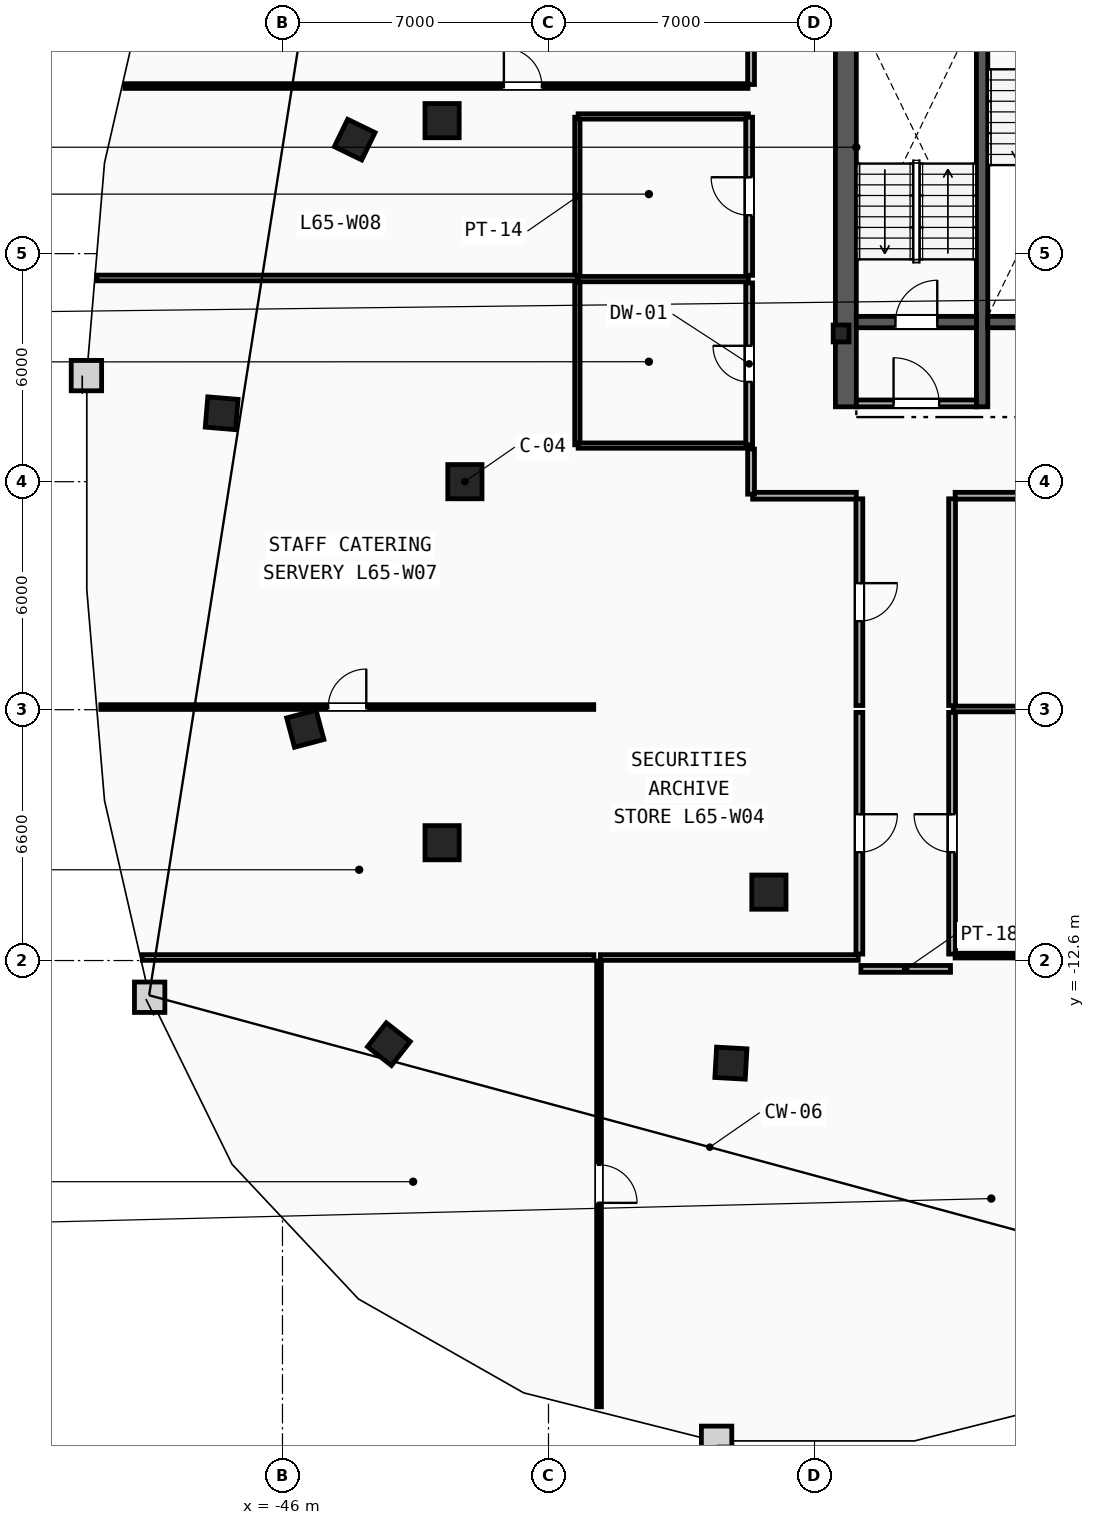
"""IFC4 building model, lengths in metres.
Left out: names, types, materials, properties, quantities, classifications, styles, units other than length and angle.
Written with IfcOpenShell. Run it as: python <this file> out.ifc"""

import sys

from ifc_helpers import new_model, si_unit, direction, frame, frame_2d, origin, origin_2d, place, context, subcontext, project, spatial, rectangle, i_section, extrude, element, fill, save


model = new_model("IFC4")
c1 = context("Model", 3, precision=1e-05, world=origin(), true_north=direction((0.0, 1.0)))
c2 = subcontext(c1, "Body", "Model", "MODEL_VIEW")
j1 = project(units=[si_unit("LENGTHUNIT", "METRE"), si_unit("PLANEANGLEUNIT", "RADIAN")], contexts=[c1])
p1 = place(None, origin())
s1 = spatial("IfcSite", under=j1, at=p1, CompositionType="ELEMENT")
p2 = place(p1, origin())
s2 = spatial("IfcBuilding", under=s1, at=p2, CompositionType="ELEMENT")
p3 = place(p2, frame((0.0, 0.0, 246.8)))
s3 = spatial("IfcBuildingStorey", under=s2, at=p3, CompositionType="ELEMENT", Elevation=246.8)
p4 = place(p3, frame((-31.3, 3.9, 0.0), z_axis=(0.0, 0.0, 1.0), x_axis=(1.0, 0.0, 0.0)))
e1 = element("IfcColumn", 1, at=p4, inside=s3, PredefinedType="COLUMN", context=c2, shape_type="SweptSolid", body=[
    extrude(i_section(OverallWidth=0.416, OverallDepth=0.446, WebThickness=0.039, FlangeThickness=0.063, FilletRadius=0.018, at=origin_2d()), origin(), (0.0, 0.0, 1.0), 3.6),
])
for number, where, z_axis, x_axis in (
    (2, (-41.2, 0.0, 0.0), (0.0, 0.0, 1.0), (1.0, 0.0, 0.0)),
    (3, (-41.8, 9.5, 0.0), (0.0, 0.0, 1.0), (1.0, 0.0, 0.0)),
    (4, (-41.8, -9.5, 0.0), (0.0, 0.0, 1.0), (1.0, 0.0, 0.0)),
    (5, (-33.2, -10.8, 0.0), (0.0, 0.0, 1.0), (1.0, 0.0, 0.0)),
):
    element("IfcColumn", number, at=place(p3, frame(where, z_axis=z_axis, x_axis=x_axis)), inside=s3, PredefinedType="COLUMN", context=c2, shape_type="SweptSolid", body=[
        extrude(rectangle(XDim=0.9, YDim=0.9, at=origin_2d()), origin(), (0.0, 0.0, 1.0), 3.6),
    ])
for number, where, z_axis, x_axis in (
    (6, (-44.1, 9.0, 0.0), (0.0, 0.0, 1.0), (-0.437, -0.899, 0.0)),
    (7, (-47.6, 1.8, 0.0), (0.0, 0.0, 1.0), (-0.084, -0.997, 0.0)),
    (8, (-45.4, -6.5, 0.0), (0.0, 0.0, 1.0), (0.256, -0.967, 0.0)),
    (9, (-43.2, -14.8, 0.0), (0.0, 0.0, 1.0), (0.786, -0.618, 0.0)),
    (10, (-34.2, -15.3, 0.0), (0.0, 0.0, 1.0), (0.998, -0.055, 0.0)),
):
    element("IfcColumn", number, at=place(p3, frame(where, z_axis=z_axis, x_axis=x_axis)), inside=s3, PredefinedType="COLUMN", context=c2, shape_type="SweptSolid", body=[
        extrude(rectangle(XDim=0.8, YDim=0.8, at=origin_2d()), origin(), (0.0, 0.0, 1.0), 3.6),
    ])
p5 = place(p3, frame((-31.175, 1.97, 0.0), z_axis=(0.0, 0.0, 1.0), x_axis=(0.0, 1.0, 0.0)))
e11 = element("IfcWall", 11, at=p5, inside=s3, PredefinedType="SHEAR", context=c2, shape_type="SweptSolid", body=[
    extrude(rectangle(XDim=13.33, YDim=0.55, at=frame_2d((6.665, 0.0))), origin(), (0.0, 0.0, 1.0), 3.34),
])
p6 = place(p3, frame((-27.59, 1.97, 0.0), z_axis=(0.0, 0.0, 1.0), x_axis=(0.0, 1.0, 0.0)))
e12 = element("IfcWall", 12, at=p6, inside=s3, PredefinedType="SHEAR", context=c2, shape_type="SweptSolid", body=[
    extrude(rectangle(XDim=10.68, YDim=0.3, at=frame_2d((5.34, 0.0))), origin(), (0.0, 0.0, 1.0), 3.34),
])
p7 = place(p3, frame((-30.9, 4.2, 0.0), z_axis=(0.0, 0.0, 1.0), x_axis=(1.0, 0.0, 0.0)))
e13 = element("IfcWall", 13, at=p7, inside=s3, PredefinedType="SHEAR", context=c2, shape_type="SweptSolid", body=[
    extrude(rectangle(XDim=3.16, YDim=0.3, at=frame_2d((1.58, 0.0))), origin(), (0.0, 0.0, 1.0), 3.34),
])
p8 = place(p7, frame((1.03, 0.0, 0.0)))
e14 = element("IfcOpeningElement", 14, at=p8, cuts=e13, PredefinedType="OPENING", context=c2, shape_type="SweptSolid", body=[
    extrude(rectangle(XDim=1.1, YDim=2.15, at=frame_2d((0.55, 1.075))), frame((0.0, 0.16, 0.0), z_axis=(0.0, -1.0, 0.0), x_axis=(1.0, 0.0, 0.0)), (0.0, 0.0, 1.0), 0.32),
])
p9 = place(p3, frame((-27.44, 4.2, 0.0), z_axis=(0.0, 0.0, 1.0), x_axis=(1.0, 0.0, 0.0)))
e15 = element("IfcWall", 15, at=p9, inside=s3, PredefinedType="SHEAR", context=c2, shape_type="SweptSolid", body=[
    extrude(rectangle(XDim=3.16, YDim=0.3, at=frame_2d((1.58, 0.0))), origin(), (0.0, 0.0, 1.0), 3.34),
])
p10 = place(p3, frame((-30.9, 2.06, 0.0), z_axis=(0.0, 0.0, 1.0), x_axis=(1.0, 0.0, 0.0)))
e16 = element("IfcWall", 16, at=p10, inside=s3, PredefinedType="PARTITIONING", context=c2, shape_type="SweptSolid", body=[
    extrude(rectangle(XDim=3.16, YDim=0.18, at=frame_2d((1.58, 0.0))), origin(), (0.0, 0.0, 1.0), 3.34),
])
p11 = place(p10, frame((0.98, 0.0, 0.0)))
e17 = element("IfcOpeningElement", 17, at=p11, cuts=e16, PredefinedType="OPENING", context=c2, shape_type="SweptSolid", body=[
    extrude(rectangle(XDim=1.2, YDim=2.15, at=frame_2d((0.6, 1.075))), frame((0.0, 0.1, 0.0), z_axis=(0.0, -1.0, 0.0), x_axis=(1.0, 0.0, 0.0)), (0.0, 0.0, 1.0), 0.2),
])
p12 = place(p3, frame((-38.24, 0.97, 0.0), z_axis=(0.0, 0.0, 1.0), x_axis=(0.0, 1.0, 0.0)))
e18 = element("IfcWall", 18, at=p12, inside=s3, PredefinedType="PARTITIONING", context=c2, shape_type="SweptSolid", body=[
    extrude(rectangle(XDim=4.275, YDim=0.14, at=frame_2d((2.138, 0.0))), origin(), (0.0, 0.0, 1.0), 3.34),
])
p13 = place(p3, frame((-38.24, 5.415, 0.0), z_axis=(0.0, 0.0, 1.0), x_axis=(0.0, 1.0, 0.0)))
e19 = element("IfcWall", 19, at=p13, inside=s3, PredefinedType="PARTITIONING", context=c2, shape_type="SweptSolid", body=[
    extrude(rectangle(XDim=4.175, YDim=0.14, at=frame_2d((2.087, 0.0))), origin(), (0.0, 0.0, 1.0), 3.34),
])
for number, where, z_axis, x_axis in (
    (20, (-38.22, 0.95, 0.0), (0.0, 0.0, 1.0), (1.0, 0.0, 0.0)),
    (21, (-38.22, 5.33, 0.0), (0.0, 0.0, 1.0), (1.0, 0.0, 0.0)),
    (22, (-38.22, 9.61, 0.0), (0.0, 0.0, 1.0), (1.0, 0.0, 0.0)),
):
    element("IfcWall", number, at=place(p3, frame(where, z_axis=z_axis, x_axis=x_axis)), inside=s3, PredefinedType="PARTITIONING", context=c2, shape_type="SweptSolid", body=[
        extrude(rectangle(XDim=4.48, YDim=0.14, at=frame_2d((2.24, 0.0))), origin(), (0.0, 0.0, 1.0), 3.34),
    ])
p14 = place(p3, frame((-33.72, 0.97, 0.0), z_axis=(0.0, 0.0, 1.0), x_axis=(0.0, 1.0, 0.0)))
e23 = element("IfcWall", 23, at=p14, inside=s3, PredefinedType="PARTITIONING", context=c2, shape_type="SweptSolid", body=[
    extrude(rectangle(XDim=4.26, YDim=0.18, at=frame_2d((2.13, 0.0))), origin(), (0.0, 0.0, 1.0), 3.34),
])
p15 = place(p14, frame((1.655, 0.0, 0.0)))
e24 = element("IfcOpeningElement", 24, at=p15, cuts=e23, PredefinedType="OPENING", context=c2, shape_type="SweptSolid", body=[
    extrude(rectangle(XDim=0.95, YDim=2.1, at=frame_2d((0.475, 1.05))), frame((0.0, 0.1, 0.0), z_axis=(0.0, -1.0, 0.0), x_axis=(1.0, 0.0, 0.0)), (0.0, 0.0, 1.0), 0.2),
])
p16 = place(p3, frame((-33.72, 5.43, 0.0), z_axis=(0.0, 0.0, 1.0), x_axis=(0.0, 1.0, 0.0)))
e25 = element("IfcWall", 25, at=p16, inside=s3, PredefinedType="PARTITIONING", context=c2, shape_type="SweptSolid", body=[
    extrude(rectangle(XDim=4.16, YDim=0.18, at=frame_2d((2.08, 0.0))), origin(), (0.0, 0.0, 1.0), 3.34),
])
p17 = place(p16, frame((1.58, 0.0, 0.0)))
e26 = element("IfcOpeningElement", 26, at=p17, cuts=e25, PredefinedType="OPENING", context=c2, shape_type="SweptSolid", body=[
    extrude(rectangle(XDim=1.0, YDim=2.15, at=frame_2d((0.5, 1.075))), frame((0.0, 0.1, 0.0), z_axis=(0.0, -1.0, 0.0), x_axis=(1.0, 0.0, 0.0)), (0.0, 0.0, 1.0), 0.2),
])
p18 = place(p3, frame((-28.35, -5.98, 0.0), z_axis=(0.0, 0.0, 1.0), x_axis=(1.0, 0.0, 0.0)))
e27 = element("IfcWall", 27, at=p18, inside=s3, PredefinedType="PARTITIONING", context=c2, shape_type="SweptSolid", body=[
    extrude(rectangle(XDim=15.185, YDim=0.15, at=frame_2d((7.593, 0.0))), origin(), (0.0, 0.0, 1.0), 3.34),
])
p19 = place(p3, frame((-49.686, -12.52, 0.0), z_axis=(0.0, 0.0, 1.0), x_axis=(1.0, 0.0, 0.0)))
e28 = element("IfcWall", 28, at=p19, inside=s3, PredefinedType="PARTITIONING", context=c2, shape_type="SweptSolid", body=[
    extrude(rectangle(XDim=11.881, YDim=0.15, at=frame_2d((5.94, 0.0))), origin(), (0.0, 0.0, 1.0), 3.34),
])
p20 = place(p3, frame((-37.635, -12.52, 0.0), z_axis=(0.0, 0.0, 1.0), x_axis=(1.0, 0.0, 0.0)))
e29 = element("IfcWall", 29, at=p20, inside=s3, PredefinedType="PARTITIONING", context=c2, shape_type="SweptSolid", body=[
    extrude(rectangle(XDim=6.785, YDim=0.15, at=frame_2d((3.393, 0.0))), origin(), (0.0, 0.0, 1.0), 3.34),
])
p21 = place(p3, frame((-50.887, 5.36, 0.0), z_axis=(0.0, 0.0, 1.0), x_axis=(1.0, 0.0, 0.0)))
e30 = element("IfcWall", 30, at=p21, inside=s3, PredefinedType="PARTITIONING", context=c2, shape_type="SweptSolid", body=[
    extrude(rectangle(XDim=12.648, YDim=0.15, at=frame_2d((6.324, 0.0))), origin(), (0.0, 0.0, 1.0), 3.34),
])
p22 = place(p3, frame((-30.779, -12.82, 0.0), z_axis=(0.0, 0.0, 1.0), x_axis=(1.0, 0.0, 0.0)))
e31 = element("IfcWall", 31, at=p22, inside=s3, PredefinedType="PARTITIONING", context=c2, shape_type="SweptSolid", body=[
    extrude(rectangle(XDim=2.357, YDim=0.18, at=frame_2d((1.179, 0.0))), origin(), (0.0, 0.0, 1.0), 3.34),
])
p23 = place(p3, frame((-30.82, -6.07, 0.0), z_axis=(0.0, 0.0, 1.0), x_axis=(0.0, -1.0, 0.0)))
e32 = element("IfcWall", 32, at=p23, inside=s3, PredefinedType="PARTITIONING", context=c2, shape_type="SweptSolid", body=[
    extrude(rectangle(XDim=6.36, YDim=0.18, at=frame_2d((3.18, 0.0))), origin(), (0.0, 0.0, 1.0), 3.34),
])
p24 = place(p23, frame((2.68, 0.0, 0.0)))
e33 = element("IfcOpeningElement", 33, at=p24, cuts=e32, PredefinedType="OPENING", context=c2, shape_type="SweptSolid", body=[
    extrude(rectangle(XDim=1.0, YDim=2.15, at=frame_2d((0.5, 1.075))), frame((0.0, 0.1, 0.0), z_axis=(0.0, -1.0, 0.0), x_axis=(1.0, 0.0, 0.0)), (0.0, 0.0, 1.0), 0.2),
])
p25 = place(p3, frame((-28.38, -12.43, 0.0), z_axis=(0.0, 0.0, 1.0), x_axis=(0.0, 1.0, 0.0)))
e34 = element("IfcWall", 34, at=p25, inside=s3, PredefinedType="PARTITIONING", context=c2, shape_type="SweptSolid", body=[
    extrude(rectangle(XDim=6.36, YDim=0.18, at=frame_2d((3.18, 0.0))), origin(), (0.0, 0.0, 1.0), 3.34),
])
p26 = place(p25, frame((2.68, 0.0, 0.0)))
e35 = element("IfcOpeningElement", 35, at=p26, cuts=e34, PredefinedType="OPENING", context=c2, shape_type="SweptSolid", body=[
    extrude(rectangle(XDim=1.0, YDim=2.15, at=frame_2d((0.5, 1.075))), frame((0.0, 0.1, 0.0), z_axis=(0.0, -1.0, 0.0), x_axis=(1.0, 0.0, 0.0)), (0.0, 0.0, 1.0), 0.2),
])
p27 = place(p3, frame((-28.3, -0.37, 0.0), z_axis=(0.0, 0.0, 1.0), x_axis=(1.0, 0.0, 0.0)))
e36 = element("IfcWall", 36, at=p27, inside=s3, PredefinedType="PARTITIONING", context=c2, shape_type="SweptSolid", body=[
    extrude(rectangle(XDim=15.349, YDim=0.18, at=frame_2d((7.675, 0.0))), origin(), (0.0, 0.0, 1.0), 3.34),
])
p28 = place(p27, frame((7.175, 0.0, 0.0)))
e37 = element("IfcOpeningElement", 37, at=p28, cuts=e36, PredefinedType="OPENING", context=c2, shape_type="SweptSolid", body=[
    extrude(rectangle(XDim=1.0, YDim=2.15, at=frame_2d((0.5, 1.075))), frame((0.0, 0.1, 0.0), z_axis=(0.0, -1.0, 0.0), x_axis=(1.0, 0.0, 0.0)), (0.0, 0.0, 1.0), 0.2),
])
p29 = place(p3, frame((-28.38, -5.89, 0.0), z_axis=(0.0, 0.0, 1.0), x_axis=(0.0, 1.0, 0.0)))
e38 = element("IfcWall", 38, at=p29, inside=s3, PredefinedType="PARTITIONING", context=c2, shape_type="SweptSolid", body=[
    extrude(rectangle(XDim=5.44, YDim=0.18, at=frame_2d((2.72, 0.0))), origin(), (0.0, 0.0, 1.0), 3.34),
])
p30 = place(p3, frame((-30.82, -0.45, 0.0), z_axis=(0.0, 0.0, 1.0), x_axis=(0.0, -1.0, 0.0)))
e39 = element("IfcWall", 39, at=p30, inside=s3, PredefinedType="PARTITIONING", context=c2, shape_type="SweptSolid", body=[
    extrude(rectangle(XDim=5.44, YDim=0.18, at=frame_2d((2.72, 0.0))), origin(), (0.0, 0.0, 1.0), 3.34),
])
p31 = place(p30, frame((2.22, 0.0, 0.0)))
e40 = element("IfcOpeningElement", 40, at=p31, cuts=e39, PredefinedType="OPENING", context=c2, shape_type="SweptSolid", body=[
    extrude(rectangle(XDim=1.0, YDim=2.15, at=frame_2d((0.5, 1.075))), frame((0.0, 0.1, 0.0), z_axis=(0.0, -1.0, 0.0), x_axis=(1.0, 0.0, 0.0)), (0.0, 0.0, 1.0), 0.2),
])
p32 = place(p3, frame((-33.628, -0.37, 0.0), z_axis=(0.0, 0.0, 1.0), x_axis=(1.0, 0.0, 0.0)))
e41 = element("IfcWall", 41, at=p32, inside=s3, PredefinedType="PARTITIONING", context=c2, shape_type="SweptSolid", body=[
    extrude(rectangle(XDim=2.729, YDim=0.18, at=frame_2d((1.364, 0.0))), origin(), (0.0, 0.0, 1.0), 3.34),
])
p33 = place(p3, frame((-33.67, 0.859, 0.0), z_axis=(0.0, 0.0, 1.0), x_axis=(0.0, -1.0, 0.0)))
e42 = element("IfcWall", 42, at=p33, inside=s3, PredefinedType="PARTITIONING", context=c2, shape_type="SweptSolid", body=[
    extrude(rectangle(XDim=1.187, YDim=0.18, at=frame_2d((0.594, 0.0))), origin(), (0.0, 0.0, 1.0), 3.34),
])
p34 = place(p3, frame((-33.67, 17.428, 0.0), z_axis=(0.0, 0.0, 1.0), x_axis=(0.0, -1.0, 0.0)))
e43 = element("IfcWall", 43, at=p34, inside=s3, PredefinedType="PARTITIONING", context=c2, shape_type="SweptSolid", body=[
    extrude(rectangle(XDim=6.979, YDim=0.18, at=frame_2d((3.489, 0.0))), origin(), (0.0, 0.0, 1.0), 3.34),
])
p35 = place(p3, frame((-28.3, -12.47, 0.0), z_axis=(0.0, 0.0, 1.0), x_axis=(1.0, 0.0, 0.0)))
e44 = element("IfcWall", 44, at=p35, inside=s3, PredefinedType="PARTITIONING", context=c2, shape_type="SweptSolid", body=[
    extrude(rectangle(XDim=13.919, YDim=0.125, at=frame_2d((6.959, 0.0))), origin(), (0.0, 0.0, 1.0), 3.34),
])
p36 = place(p35, frame((6.459, 0.0, 0.0)))
e45 = element("IfcOpeningElement", 45, at=p36, cuts=e44, PredefinedType="OPENING", context=c2, shape_type="SweptSolid", body=[
    extrude(rectangle(XDim=1.0, YDim=2.15, at=frame_2d((0.5, 1.075))), frame((0.0, 0.073, 0.0), z_axis=(0.0, -1.0, 0.0), x_axis=(1.0, 0.0, 0.0)), (0.0, 0.0, 1.0), 0.145),
])
p37 = place(p3, frame((-37.67, -12.61, 0.0), z_axis=(0.0, 0.0, 1.0), x_axis=(0.0, -1.0, 0.0)))
e46 = element("IfcWall", 46, at=p37, inside=s3, PredefinedType="PARTITIONING", context=c2, shape_type="SweptSolid", body=[
    extrude(rectangle(XDim=11.731, YDim=0.125, at=frame_2d((5.866, 0.0))), origin(), (0.0, 0.0, 1.0), 3.34),
])
p38 = place(p37, frame((5.366, 0.0, 0.0)))
e47 = element("IfcOpeningElement", 47, at=p38, cuts=e46, PredefinedType="OPENING", context=c2, shape_type="SweptSolid", body=[
    extrude(rectangle(XDim=1.0, YDim=2.15, at=frame_2d((0.5, 1.075))), frame((0.0, 0.073, 0.0), z_axis=(0.0, -1.0, 0.0), x_axis=(1.0, 0.0, 0.0)), (0.0, 0.0, 1.0), 0.145),
])
p39 = place(p3, frame((-50.779, -5.93, 0.0), z_axis=(0.0, 0.0, 1.0), x_axis=(1.0, 0.0, 0.0)))
e48 = element("IfcWall", 48, at=p39, inside=s3, PredefinedType="PARTITIONING", context=c2, shape_type="SweptSolid", body=[
    extrude(rectangle(XDim=12.969, YDim=0.125, at=frame_2d((6.485, 0.0))), origin(), (0.0, 0.0, 1.0), 3.34),
])
p40 = place(p39, frame((5.985, 0.0, 0.0)))
e49 = element("IfcOpeningElement", 49, at=p40, cuts=e48, PredefinedType="OPENING", context=c2, shape_type="SweptSolid", body=[
    extrude(rectangle(XDim=1.0, YDim=2.15, at=frame_2d((0.5, 1.075))), frame((0.0, 0.073, 0.0), z_axis=(0.0, -1.0, 0.0), x_axis=(1.0, 0.0, 0.0)), (0.0, 0.0, 1.0), 0.145),
])
p41 = place(p3, frame((-50.146, 10.41, 0.0), z_axis=(0.0, 0.0, 1.0), x_axis=(1.0, 0.0, 0.0)))
e50 = element("IfcWall", 50, at=p41, inside=s3, PredefinedType="PARTITIONING", context=c2, shape_type="SweptSolid", body=[
    extrude(rectangle(XDim=16.396, YDim=0.125, at=frame_2d((8.198, 0.0))), origin(), (0.0, 0.0, 1.0), 3.34),
])
p42 = place(p41, frame((9.971, 0.0, 0.0)))
e51 = element("IfcOpeningElement", 51, at=p42, cuts=e50, PredefinedType="OPENING", context=c2, shape_type="SweptSolid", body=[
    extrude(rectangle(XDim=1.0, YDim=2.15, at=frame_2d((0.5, 1.075))), frame((0.0, 0.073, 0.0), z_axis=(0.0, -1.0, 0.0), x_axis=(1.0, 0.0, 0.0)), (0.0, 0.0, 1.0), 0.145),
])
p43 = place(p8, origin())
e52 = element("IfcDoor", 52, at=p43, inside=s3, OperationType="SINGLE_SWING_RIGHT", PredefinedType="DOOR", context=c2, shape_type="SweptSolid", body=[
    extrude(rectangle(XDim=1.1, YDim=2.15, at=frame_2d((0.55, 1.075))), frame((0.0, 0.025, 0.0), z_axis=(0.0, -1.0, 0.0), x_axis=(1.0, 0.0, 0.0)), (0.0, 0.0, 1.0), 0.05),
])
fill(e14, e52)
p44 = place(p11, origin())
e53 = element("IfcDoor", 53, at=p44, inside=s3, OperationType="SINGLE_SWING_LEFT", PredefinedType="DOOR", context=c2, shape_type="SweptSolid", body=[
    extrude(rectangle(XDim=1.2, YDim=2.15, at=frame_2d((0.6, 1.075))), frame((0.0, 0.025, 0.0), z_axis=(0.0, -1.0, 0.0), x_axis=(1.0, 0.0, 0.0)), (0.0, 0.0, 1.0), 0.05),
])
fill(e17, e53)
p45 = place(p42, origin())
e54 = element("IfcDoor", 54, at=p45, inside=s3, OperationType="SINGLE_SWING_LEFT", PredefinedType="DOOR", context=c2, shape_type="SweptSolid", body=[
    extrude(rectangle(XDim=1.0, YDim=2.15, at=frame_2d((0.5, 1.075))), frame((0.0, 0.025, 0.0), z_axis=(0.0, -1.0, 0.0), x_axis=(1.0, 0.0, 0.0)), (0.0, 0.0, 1.0), 0.05),
])
fill(e51, e54)
p46 = place(p40, origin())
e55 = element("IfcDoor", 55, at=p46, inside=s3, OperationType="SINGLE_SWING_RIGHT", PredefinedType="DOOR", context=c2, shape_type="SweptSolid", body=[
    extrude(rectangle(XDim=1.0, YDim=2.15, at=frame_2d((0.5, 1.075))), frame((0.0, 0.025, 0.0), z_axis=(0.0, -1.0, 0.0), x_axis=(1.0, 0.0, 0.0)), (0.0, 0.0, 1.0), 0.05),
])
fill(e49, e55)
p47 = place(p38, origin())
e56 = element("IfcDoor", 56, at=p47, inside=s3, OperationType="SINGLE_SWING_RIGHT", PredefinedType="DOOR", context=c2, shape_type="SweptSolid", body=[
    extrude(rectangle(XDim=1.0, YDim=2.15, at=frame_2d((0.5, 1.075))), frame((0.0, 0.025, 0.0), z_axis=(0.0, -1.0, 0.0), x_axis=(1.0, 0.0, 0.0)), (0.0, 0.0, 1.0), 0.05),
])
fill(e47, e56)
p48 = place(p24, origin())
e57 = element("IfcDoor", 57, at=p48, inside=s3, OperationType="SINGLE_SWING_LEFT", PredefinedType="DOOR", context=c2, shape_type="SweptSolid", body=[
    extrude(rectangle(XDim=1.0, YDim=2.15, at=frame_2d((0.5, 1.075))), frame((0.0, 0.025, 0.0), z_axis=(0.0, -1.0, 0.0), x_axis=(1.0, 0.0, 0.0)), (0.0, 0.0, 1.0), 0.05),
])
fill(e33, e57)
p49 = place(p26, origin())
e58 = element("IfcDoor", 58, at=p49, inside=s3, OperationType="SINGLE_SWING_RIGHT", PredefinedType="DOOR", context=c2, shape_type="SweptSolid", body=[
    extrude(rectangle(XDim=1.0, YDim=2.15, at=frame_2d((0.5, 1.075))), frame((0.0, 0.025, 0.0), z_axis=(0.0, -1.0, 0.0), x_axis=(1.0, 0.0, 0.0)), (0.0, 0.0, 1.0), 0.05),
])
fill(e35, e58)
p50 = place(p31, origin())
e59 = element("IfcDoor", 59, at=p50, inside=s3, OperationType="SINGLE_SWING_LEFT", PredefinedType="DOOR", context=c2, shape_type="SweptSolid", body=[
    extrude(rectangle(XDim=1.0, YDim=2.15, at=frame_2d((0.5, 1.075))), frame((0.0, 0.025, 0.0), z_axis=(0.0, -1.0, 0.0), x_axis=(1.0, 0.0, 0.0)), (0.0, 0.0, 1.0), 0.05),
])
fill(e40, e59)
p51 = place(p15, origin())
e60 = element("IfcDoor", 60, at=p51, inside=s3, OperationType="SINGLE_SWING_RIGHT", PredefinedType="DOOR", context=c2, shape_type="SweptSolid", body=[
    extrude(rectangle(XDim=0.95, YDim=2.1, at=frame_2d((0.475, 1.05))), frame((0.0, 0.025, 0.0), z_axis=(0.0, -1.0, 0.0), x_axis=(1.0, 0.0, 0.0)), (0.0, 0.0, 1.0), 0.05),
])
fill(e24, e60)
p52 = place(p17, origin())
e61 = element("IfcDoor", 61, at=p52, inside=s3, OperationType="SINGLE_SWING_RIGHT", PredefinedType="DOOR", context=c2, shape_type="SweptSolid", body=[
    extrude(rectangle(XDim=1.0, YDim=2.15, at=frame_2d((0.5, 1.075))), frame((0.0, 0.025, 0.0), z_axis=(0.0, -1.0, 0.0), x_axis=(1.0, 0.0, 0.0)), (0.0, 0.0, 1.0), 0.05),
])
fill(e26, e61)
save(model, sys.argv[1])
